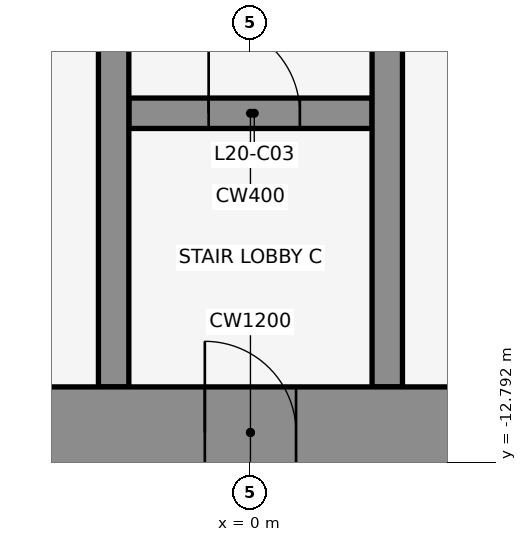
"""IFC4 building model, lengths in metres.
Left out: names, types, materials, properties, quantities, classifications, styles, units other than length and angle.
Written with IfcOpenShell. Run it as: python <this file> out.ifc"""

import sys

from ifc_helpers import new_model, si_unit, direction, frame, frame_2d, origin, place, context, subcontext, project, spatial, rectangle, extrude, element, fill, save


model = new_model("IFC4")
c1 = context("Model", 3, precision=1e-05, world=origin(), true_north=direction((0.0, 1.0)))
c2 = subcontext(c1, "Body", "Model", "MODEL_VIEW")
j1 = project(units=[si_unit("LENGTHUNIT", "METRE"), si_unit("PLANEANGLEUNIT", "RADIAN")], contexts=[c1])
p1 = place(None, origin())
s1 = spatial("IfcSite", under=j1, at=p1, CompositionType="ELEMENT")
p2 = place(p1, origin())
s2 = spatial("IfcBuilding", under=s1, at=p2, CompositionType="ELEMENT")
p3 = place(p2, frame((0.0, 0.0, 98.1)))
s3 = spatial("IfcBuildingStorey", under=s2, at=p3, CompositionType="ELEMENT", Elevation=98.1)
p4 = place(p3, frame((-1.6, -8.2, 0.0), z_axis=(0.0, 0.0, 1.0), x_axis=(1.0, 0.0, 0.0)))
e1 = element("IfcWall", 1, at=p4, inside=s3, PredefinedType="SHEAR", context=c2, shape_type="SweptSolid", body=[
    extrude(rectangle(XDim=3.2, YDim=0.4, at=frame_2d((1.6, 0.0))), origin(), (0.0, 0.0, 1.0), 4.1),
])
p5 = place(p4, frame((1.05, 0.0, 0.0)))
e2 = element("IfcOpeningElement", 2, at=p5, cuts=e1, PredefinedType="OPENING", context=c2, shape_type="SweptSolid", body=[
    extrude(rectangle(XDim=1.2, YDim=2.1, at=frame_2d((0.6, 1.05))), frame((0.0, 0.212, 0.0), z_axis=(0.0, -1.0, 0.0), x_axis=(1.0, 0.0, 0.0)), (0.0, 0.0, 1.0), 0.424),
])
for number, where, z_axis, x_axis in (
    (3, (-1.8, -11.8, 0.0), (0.0, 0.0, 1.0), (0.0, 1.0, 0.0)),
    (4, (1.8, -11.8, 0.0), (0.0, 0.0, 1.0), (0.0, 1.0, 0.0)),
):
    element("IfcWall", number, at=place(p3, frame(where, z_axis=z_axis, x_axis=x_axis)), inside=s3, PredefinedType="SHEAR", context=c2, shape_type="SweptSolid", body=[
        extrude(rectangle(XDim=10.6, YDim=0.4, at=frame_2d((5.3, 0.0))), origin(), (0.0, 0.0, 1.0), 4.1),
    ])
p6 = place(p3, frame((-22.0, -12.4, 0.0), z_axis=(0.0, 0.0, 1.0), x_axis=(1.0, 0.0, 0.0)))
e5 = element("IfcWall", 5, at=p6, inside=s3, PredefinedType="SHEAR", context=c2, shape_type="SweptSolid", body=[
    extrude(rectangle(XDim=44.0, YDim=1.2, at=frame_2d((22.0, 0.0))), origin(), (0.0, 0.0, 1.0), 4.1),
])
p7 = place(p6, frame((2.2, 0.0, 0.0)))
e6 = element("IfcOpeningElement", 6, at=p7, cuts=e5, PredefinedType="OPENING", context=c2, shape_type="SweptSolid", body=[
    extrude(rectangle(XDim=1.2, YDim=2.1, at=frame_2d((0.6, 1.05))), frame((0.0, 0.612, 0.0), z_axis=(0.0, -1.0, 0.0), x_axis=(1.0, 0.0, 0.0)), (0.0, 0.0, 1.0), 1.224),
])
p8 = place(p6, frame((21.4, 0.0, 0.0)))
e7 = element("IfcOpeningElement", 7, at=p8, cuts=e5, PredefinedType="OPENING", context=c2, shape_type="SweptSolid", body=[
    extrude(rectangle(XDim=1.2, YDim=2.1, at=frame_2d((0.6, 1.05))), frame((0.0, 0.612, 0.0), z_axis=(0.0, -1.0, 0.0), x_axis=(1.0, 0.0, 0.0)), (0.0, 0.0, 1.0), 1.224),
])
p9 = place(p6, frame((40.6, 0.0, 0.0)))
e8 = element("IfcOpeningElement", 8, at=p9, cuts=e5, PredefinedType="OPENING", context=c2, shape_type="SweptSolid", body=[
    extrude(rectangle(XDim=1.2, YDim=2.1, at=frame_2d((0.6, 1.05))), frame((0.0, 0.612, 0.0), z_axis=(0.0, -1.0, 0.0), x_axis=(1.0, 0.0, 0.0)), (0.0, 0.0, 1.0), 1.224),
])
p10 = place(p6, frame((16.0, 0.0, 0.0)))
e9 = element("IfcOpeningElement", 9, at=p10, cuts=e5, PredefinedType="OPENING", context=c2, shape_type="SweptSolid", body=[
    extrude(rectangle(XDim=1.8, YDim=2.1, at=frame_2d((0.9, 1.05))), frame((0.0, 0.612, 0.0), z_axis=(0.0, -1.0, 0.0), x_axis=(1.0, 0.0, 0.0)), (0.0, 0.0, 1.0), 1.224),
])
p11 = place(p6, frame((6.3, 0.0, 0.0)))
e10 = element("IfcOpeningElement", 10, at=p11, cuts=e5, PredefinedType="OPENING", context=c2, shape_type="SweptSolid", body=[
    extrude(rectangle(XDim=1.2, YDim=2.1, at=frame_2d((0.6, 1.05))), frame((0.0, 0.612, 0.0), z_axis=(0.0, -1.0, 0.0), x_axis=(1.0, 0.0, 0.0)), (0.0, 0.0, 1.0), 1.224),
])
p12 = place(p6, frame((26.2, 0.0, 0.0)))
e11 = element("IfcOpeningElement", 11, at=p12, cuts=e5, PredefinedType="OPENING", context=c2, shape_type="SweptSolid", body=[
    extrude(rectangle(XDim=1.8, YDim=2.1, at=frame_2d((0.9, 1.05))), frame((0.0, 0.612, 0.0), z_axis=(0.0, -1.0, 0.0), x_axis=(1.0, 0.0, 0.0)), (0.0, 0.0, 1.0), 1.224),
])
p13 = place(p6, frame((36.5, 0.0, 0.0)))
e12 = element("IfcOpeningElement", 12, at=p13, cuts=e5, PredefinedType="OPENING", context=c2, shape_type="SweptSolid", body=[
    extrude(rectangle(XDim=1.2, YDim=2.1, at=frame_2d((0.6, 1.05))), frame((0.0, 0.612, 0.0), z_axis=(0.0, -1.0, 0.0), x_axis=(1.0, 0.0, 0.0)), (0.0, 0.0, 1.0), 1.224),
])
p14 = place(p5, origin())
e13 = element("IfcDoor", 13, at=p14, inside=s3, OperationType="SINGLE_SWING_LEFT", PredefinedType="DOOR", context=c2, shape_type="SweptSolid", body=[
    extrude(rectangle(XDim=1.2, YDim=2.1, at=frame_2d((0.6, 1.05))), frame((0.0, 0.025, 0.0), z_axis=(0.0, -1.0, 0.0), x_axis=(1.0, 0.0, 0.0)), (0.0, 0.0, 1.0), 0.05),
])
fill(e2, e13)
p15 = place(p8, frame((1.2, 0.0, 0.0), z_axis=(0.0, 0.0, 1.0), x_axis=(-1.0, 0.0, 0.0)))
e14 = element("IfcDoor", 14, at=p15, inside=s3, OperationType="SINGLE_SWING_RIGHT", PredefinedType="DOOR", context=c2, shape_type="SweptSolid", body=[
    extrude(rectangle(XDim=1.2, YDim=2.1, at=frame_2d((0.6, 1.05))), frame((0.0, 0.025, 0.0), z_axis=(0.0, -1.0, 0.0), x_axis=(1.0, 0.0, 0.0)), (0.0, 0.0, 1.0), 0.05),
])
fill(e7, e14)
save(model, sys.argv[1])
